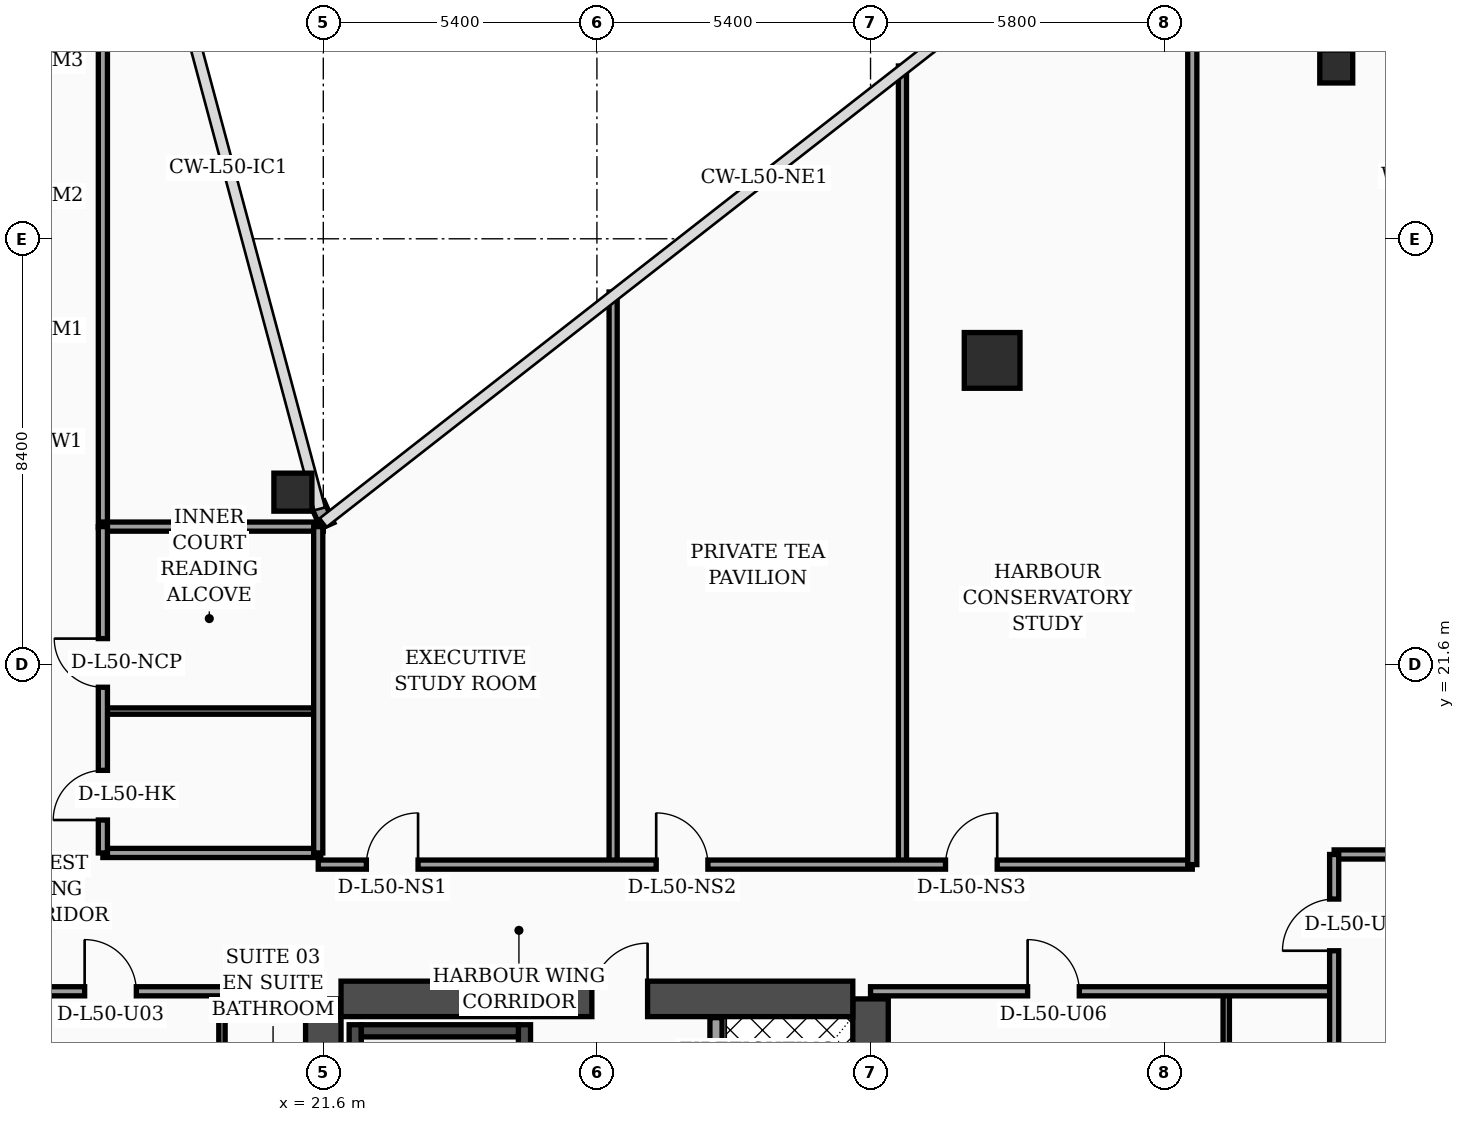
"""IFC4 building model, lengths in metres.
Left out: names, types, materials, properties, quantities, classifications, styles, units other than length and angle.
Written with IfcOpenShell. Run it as: python <this file> out.ifc"""

import sys

from ifc_helpers import new_model, si_unit, direction, frame, frame_2d, origin, origin_2d, place, context, subcontext, project, spatial, rectangle, hollow_rectangle, circle, extrude, element, fill, save


model = new_model("IFC4")
c1 = context("Model", 3, precision=1e-05, world=origin(), true_north=direction((0.0, 1.0)))
c2 = subcontext(c1, "Body", "Model", "MODEL_VIEW")
j1 = project(units=[si_unit("LENGTHUNIT", "METRE"), si_unit("PLANEANGLEUNIT", "RADIAN")], contexts=[c1])
p1 = place(None, origin())
s1 = spatial("IfcSite", under=j1, at=p1, CompositionType="ELEMENT")
p2 = place(p1, origin())
s2 = spatial("IfcBuilding", under=s1, at=p2, CompositionType="ELEMENT")
p3 = place(p2, frame((0.0, 0.0, 203.4)))
s3 = spatial("IfcBuildingStorey", under=s2, at=p3, CompositionType="ELEMENT", Elevation=203.4)
for number, where, z_axis, x_axis in (
    (1, (21.6, 4.6, 0.0), (0.0, 0.0, 1.0), (0.0, 1.0, 0.0)),
    (2, (32.4, 4.6, 0.0), (0.0, 0.0, 1.0), (0.0, 1.0, 0.0)),
):
    element("IfcWall", number, at=place(p3, frame(where, z_axis=z_axis, x_axis=x_axis)), inside=s3, PredefinedType="SHEAR", context=c2, shape_type="SweptSolid", body=[
        extrude(rectangle(XDim=10.4, YDim=0.7, at=frame_2d((5.2, 0.0))), origin(), (0.0, 0.0, 1.0), 3.56),
    ])
p4 = place(p3, frame((21.95, 15.0, 0.0), z_axis=(0.0, 0.0, 1.0), x_axis=(1.0, 0.0, 0.0)))
e3 = element("IfcWall", 3, at=p4, inside=s3, PredefinedType="SHEAR", context=c2, shape_type="SweptSolid", body=[
    extrude(rectangle(XDim=10.1, YDim=0.7, at=frame_2d((5.05, 0.0))), origin(), (0.0, 0.0, 1.0), 3.56),
])
p5 = place(p4, frame((4.95, 0.0, 0.0)))
e4 = element("IfcOpeningElement", 4, at=p5, cuts=e3, PredefinedType="OPENING", context=c2, shape_type="SweptSolid", body=[
    extrude(rectangle(XDim=1.1, YDim=2.2, at=frame_2d((0.55, 1.1))), frame((0.0, 0.36, 0.0), z_axis=(0.0, -1.0, 0.0), x_axis=(1.0, 0.0, 0.0)), (0.0, 0.0, 1.0), 0.72),
])
p6 = place(p3, frame((22.23, 4.95, 0.0), z_axis=(0.0, 0.0, 1.0), x_axis=(0.0, 1.0, 0.0)))
e5 = element("IfcWall", 5, at=p6, inside=s3, PredefinedType="SOLIDWALL", context=c2, shape_type="SweptSolid", body=[
    extrude(rectangle(XDim=9.54, YDim=0.24, at=frame_2d((4.77, 0.0))), origin(), (0.0, 0.0, 1.0), 3.56),
])
p7 = place(p3, frame((25.57, 4.95, 0.0), z_axis=(0.0, 0.0, 1.0), x_axis=(0.0, 1.0, 0.0)))
e6 = element("IfcWall", 6, at=p7, inside=s3, PredefinedType="SOLIDWALL", context=c2, shape_type="SweptSolid", body=[
    extrude(rectangle(XDim=9.54, YDim=0.24, at=frame_2d((4.77, 0.0))), origin(), (0.0, 0.0, 1.0), 3.56),
])
p8 = place(p7, frame((0.35, 0.0, 0.0)))
e7 = element("IfcOpeningElement", 7, at=p8, cuts=e6, PredefinedType="OPENING", context=c2, shape_type="SweptSolid", body=[
    extrude(rectangle(XDim=1.15, YDim=2.2, at=frame_2d((0.575, 1.1))), frame((0.0, 0.13, 0.0), z_axis=(0.0, -1.0, 0.0), x_axis=(1.0, 0.0, 0.0)), (0.0, 0.0, 1.0), 0.26),
])
p9 = place(p3, frame((22.35, 14.37, 0.0), z_axis=(0.0, 0.0, 1.0), x_axis=(1.0, 0.0, 0.0)))
e8 = element("IfcWall", 8, at=p9, inside=s3, PredefinedType="SOLIDWALL", context=c2, shape_type="SweptSolid", body=[
    extrude(rectangle(XDim=3.1, YDim=0.24, at=frame_2d((1.55, 0.0))), origin(), (0.0, 0.0, 1.0), 3.56),
])
p10 = place(p3, frame((21.0, 25.0, 0.0), z_axis=(0.0, 0.0, 1.0), x_axis=(1.0, 0.0, 0.0)))
e9 = element("IfcColumn", 9, at=p10, inside=s3, PredefinedType="COLUMN", context=c2, shape_type="SweptSolid", body=[
    extrude(hollow_rectangle(XDim=0.75, YDim=0.75, WallThickness=0.032, at=origin_2d()), origin(), (0.0, 0.0, 1.0), 3.56),
])
p11 = place(p3, frame((34.8, 27.6, 0.0), z_axis=(0.0, 0.0, 1.0), x_axis=(1.0, 0.0, 0.0)))
e10 = element("IfcColumn", 10, at=p11, inside=s3, PredefinedType="COLUMN", context=c2, shape_type="SweptSolid", body=[
    extrude(circle(Radius=0.55, at=origin_2d()), origin(), (0.0, 0.0, 1.0), 3.56),
])
p12 = place(p3, frame((41.591, 33.4, 0.0), z_axis=(0.0, 0.0, 1.0), x_axis=(1.0, 0.0, 0.0)))
e11 = element("IfcColumn", 11, at=p12, inside=s3, PredefinedType="COLUMN", context=c2, shape_type="SweptSolid", body=[
    extrude(hollow_rectangle(XDim=0.65, YDim=0.65, WallThickness=0.028, at=origin_2d()), origin(), (0.0, 0.0, 1.0), 3.56),
])
p13 = place(p3, frame((21.68, 24.34, 0.0), z_axis=(0.0, 0.0, 1.0), x_axis=(-0.40758134973, 0.913168901875, 0.0)))
e12 = element("IfcWall", 12, at=p13, inside=s3, PredefinedType="SOLIDWALL", context=c2, shape_type="SweptSolid", body=[
    extrude(rectangle(XDim=0.471, YDim=0.28, at=frame_2d((0.235, 0.0))), origin(), (0.0, 0.0, 1.0), 3.56),
])
p14 = place(p3, frame((29.35, 4.97, 0.0), z_axis=(0.0, 0.0, 1.0), x_axis=(0.0, 1.0, 0.0)))
e13 = element("IfcWall", 13, at=p14, inside=s3, PredefinedType="SOLIDWALL", context=c2, shape_type="SweptSolid", body=[
    extrude(rectangle(XDim=9.66, YDim=0.24, at=frame_2d((4.83, 0.0))), origin(), (0.0, 0.0, 1.0), 3.56),
])
p15 = place(p14, frame((0.55, 0.0, 0.0)))
e14 = element("IfcOpeningElement", 14, at=p15, cuts=e13, PredefinedType="OPENING", context=c2, shape_type="SweptSolid", body=[
    extrude(rectangle(XDim=1.3, YDim=2.35, at=frame_2d((0.65, 1.175))), frame((0.0, 0.13, 0.0), z_axis=(0.0, -1.0, 0.0), x_axis=(1.0, 0.0, 0.0)), (0.0, 0.0, 1.0), 0.26),
])
p16 = place(p3, frame((19.6, 2.44, 0.0), z_axis=(0.0, 0.0, 1.0), x_axis=(0.0, 1.0, 0.0)))
e15 = element("IfcWall", 15, at=p16, inside=s3, PredefinedType="PARTITIONING", context=c2, shape_type="SweptSolid", body=[
    extrude(rectangle(XDim=12.71, YDim=0.125, at=frame_2d((6.355, 0.0))), origin(), (0.0, 0.0, 1.0), 2.59),
])
p17 = place(p16, frame((4.34, 0.0, 0.0)))
e16 = element("IfcOpeningElement", 16, at=p17, cuts=e15, PredefinedType="OPENING", context=c2, shape_type="SweptSolid", body=[
    extrude(rectangle(XDim=0.96, YDim=2.2, at=frame_2d((0.48, 1.1))), frame((0.0, 0.073, 0.0), z_axis=(0.0, -1.0, 0.0), x_axis=(1.0, 0.0, 0.0)), (0.0, 0.0, 1.0), 0.145),
])
p18 = place(p16, frame((10.18, 0.0, 0.0)))
e17 = element("IfcOpeningElement", 17, at=p18, cuts=e15, PredefinedType="OPENING", context=c2, shape_type="SweptSolid", body=[
    extrude(rectangle(XDim=0.9, YDim=2.15, at=frame_2d((0.45, 1.075))), frame((0.0, 0.073, 0.0), z_axis=(0.0, -1.0, 0.0), x_axis=(1.0, 0.0, 0.0)), (0.0, 0.0, 1.0), 0.145),
])
p19 = place(p3, frame((15.15, 15.15, 0.0), z_axis=(0.0, 0.0, 1.0), x_axis=(1.0, 0.0, 0.0)))
e18 = element("IfcWall", 18, at=p19, inside=s3, PredefinedType="PARTITIONING", context=c2, shape_type="SweptSolid", body=[
    extrude(rectangle(XDim=6.45, YDim=0.18, at=frame_2d((3.225, 0.0))), origin(), (0.0, 0.0, 1.0), 2.59),
])
p20 = place(p19, frame((1.74, 0.0, 0.0)))
e19 = element("IfcOpeningElement", 19, at=p20, cuts=e18, PredefinedType="OPENING", context=c2, shape_type="SweptSolid", body=[
    extrude(rectangle(XDim=1.02, YDim=2.2, at=frame_2d((0.51, 1.1))), frame((0.0, 0.1, 0.0), z_axis=(0.0, -1.0, 0.0), x_axis=(1.0, 0.0, 0.0)), (0.0, 0.0, 1.0), 0.2),
])
p21 = place(p3, frame((17.25, 24.3, 0.0), z_axis=(0.0, 0.0, 1.0), x_axis=(0.0, 1.0, 0.0)))
e20 = element("IfcWall", 20, at=p21, inside=s3, PredefinedType="PARTITIONING", context=c2, shape_type="SweptSolid", body=[
    extrude(rectangle(XDim=18.15, YDim=0.18, at=frame_2d((9.075, 0.0))), origin(), (0.0, 0.0, 1.0), 2.94),
])
p22 = place(p3, frame((17.25, 17.88, 0.0), z_axis=(0.0, 0.0, 1.0), x_axis=(1.0, 0.0, 0.0)))
e21 = element("IfcWall", 21, at=p22, inside=s3, PredefinedType="PARTITIONING", context=c2, shape_type="SweptSolid", body=[
    extrude(rectangle(XDim=4.3, YDim=0.18, at=frame_2d((2.15, 0.0))), origin(), (0.0, 0.0, 1.0), 3.56),
])
p23 = place(p3, frame((17.25, 20.68, 0.0), z_axis=(0.0, 0.0, 1.0), x_axis=(1.0, 0.0, 0.0)))
e22 = element("IfcWall", 22, at=p23, inside=s3, PredefinedType="PARTITIONING", context=c2, shape_type="SweptSolid", body=[
    extrude(rectangle(XDim=4.3, YDim=0.125, at=frame_2d((2.15, 0.0))), origin(), (0.0, 0.0, 1.0), 3.56),
])
p24 = place(p3, frame((17.25, 24.32, 0.0), z_axis=(0.0, 0.0, 1.0), x_axis=(1.0, 0.0, 0.0)))
e23 = element("IfcWall", 23, at=p24, inside=s3, PredefinedType="PARTITIONING", context=c2, shape_type="SweptSolid", body=[
    extrude(rectangle(XDim=4.35, YDim=0.18, at=frame_2d((2.175, 0.0))), origin(), (0.0, 0.0, 1.0), 3.56),
])
p25 = place(p3, frame((21.5, 17.88, 0.0), z_axis=(0.0, 0.0, 1.0), x_axis=(0.0, 1.0, 0.0)))
e24 = element("IfcWall", 24, at=p25, inside=s3, PredefinedType="PARTITIONING", context=c2, shape_type="SweptSolid", body=[
    extrude(rectangle(XDim=6.44, YDim=0.18, at=frame_2d((3.22, 0.0))), origin(), (0.0, 0.0, 1.0), 3.09),
])
p26 = place(p3, frame((17.25, 17.88, 0.0), z_axis=(0.0, 0.0, 1.0), x_axis=(0.0, 1.0, 0.0)))
e25 = element("IfcWall", 25, at=p26, inside=s3, PredefinedType="PARTITIONING", context=c2, shape_type="SweptSolid", body=[
    extrude(rectangle(XDim=6.44, YDim=0.18, at=frame_2d((3.22, 0.0))), origin(), (0.0, 0.0, 1.0), 3.09),
])
p27 = place(p26, frame((0.65, 0.0, 0.0)))
e26 = element("IfcOpeningElement", 26, at=p27, cuts=e25, PredefinedType="OPENING", context=c2, shape_type="SweptSolid", body=[
    extrude(rectangle(XDim=0.98, YDim=2.15, at=frame_2d((0.49, 1.075))), frame((0.0, 0.1, 0.0), z_axis=(0.0, -1.0, 0.0), x_axis=(1.0, 0.0, 0.0)), (0.0, 0.0, 1.0), 0.2),
])
p28 = place(p26, frame((3.27, 0.0, 0.0)))
e27 = element("IfcOpeningElement", 27, at=p28, cuts=e25, PredefinedType="OPENING", context=c2, shape_type="SweptSolid", body=[
    extrude(rectangle(XDim=0.96, YDim=2.2, at=frame_2d((0.48, 1.1))), frame((0.0, 0.1, 0.0), z_axis=(0.0, -1.0, 0.0), x_axis=(1.0, 0.0, 0.0)), (0.0, 0.0, 1.0), 0.2),
])
p29 = place(p3, frame((39.42, 2.44, 0.0), z_axis=(0.0, 0.0, 1.0), x_axis=(0.0, 1.0, 0.0)))
e28 = element("IfcWall", 28, at=p29, inside=s3, PredefinedType="PARTITIONING", context=c2, shape_type="SweptSolid", body=[
    extrude(rectangle(XDim=12.71, YDim=0.125, at=frame_2d((6.355, 0.0))), origin(), (0.0, 0.0, 1.0), 2.94),
])
p30 = place(p29, frame((4.35, 0.0, 0.0)))
e29 = element("IfcOpeningElement", 29, at=p30, cuts=e28, PredefinedType="OPENING", context=c2, shape_type="SweptSolid", body=[
    extrude(rectangle(XDim=0.96, YDim=2.2, at=frame_2d((0.48, 1.1))), frame((0.0, 0.073, 0.0), z_axis=(0.0, -1.0, 0.0), x_axis=(1.0, 0.0, 0.0)), (0.0, 0.0, 1.0), 0.145),
])
p31 = place(p29, frame((10.21, 0.0, 0.0)))
e30 = element("IfcOpeningElement", 30, at=p31, cuts=e28, PredefinedType="OPENING", context=c2, shape_type="SweptSolid", body=[
    extrude(rectangle(XDim=0.9, YDim=2.15, at=frame_2d((0.45, 1.075))), frame((0.0, 0.073, 0.0), z_axis=(0.0, -1.0, 0.0), x_axis=(1.0, 0.0, 0.0)), (0.0, 0.0, 1.0), 0.145),
])
p32 = place(p3, frame((32.4, 15.15, 0.0), z_axis=(0.0, 0.0, 1.0), x_axis=(1.0, 0.0, 0.0)))
e31 = element("IfcWall", 31, at=p32, inside=s3, PredefinedType="PARTITIONING", context=c2, shape_type="SweptSolid", body=[
    extrude(rectangle(XDim=9.15, YDim=0.18, at=frame_2d((4.575, 0.0))), origin(), (0.0, 0.0, 1.0), 2.94),
])
p33 = place(p32, frame((3.1, 0.0, 0.0)))
e32 = element("IfcOpeningElement", 32, at=p33, cuts=e31, PredefinedType="OPENING", context=c2, shape_type="SweptSolid", body=[
    extrude(rectangle(XDim=1.02, YDim=2.2, at=frame_2d((0.51, 1.1))), frame((0.0, 0.1, 0.0), z_axis=(0.0, -1.0, 0.0), x_axis=(1.0, 0.0, 0.0)), (0.0, 0.0, 1.0), 0.2),
])
p34 = place(p3, frame((27.32, 17.65, 0.0), z_axis=(0.0, 0.0, 1.0), x_axis=(0.0, 1.0, 0.0)))
e33 = element("IfcWall", 33, at=p34, inside=s3, PredefinedType="PARTITIONING", context=c2, shape_type="SweptSolid", body=[
    extrude(rectangle(XDim=11.3, YDim=0.16, at=frame_2d((5.65, 0.0))), origin(), (0.0, 0.0, 1.0), 2.94),
])
p35 = place(p3, frame((33.03, 17.65, 0.0), z_axis=(0.0, 0.0, 1.0), x_axis=(0.0, 1.0, 0.0)))
e34 = element("IfcWall", 34, at=p35, inside=s3, PredefinedType="PARTITIONING", context=c2, shape_type="SweptSolid", body=[
    extrude(rectangle(XDim=15.76, YDim=0.16, at=frame_2d((7.88, 0.0))), origin(), (0.0, 0.0, 1.0), 2.94),
])
p36 = place(p3, frame((21.5, 17.65, 0.0), z_axis=(0.0, 0.0, 1.0), x_axis=(1.0, 0.0, 0.0)))
e35 = element("IfcWall", 35, at=p36, inside=s3, PredefinedType="PARTITIONING", context=c2, shape_type="SweptSolid", body=[
    extrude(rectangle(XDim=17.25, YDim=0.18, at=frame_2d((8.625, 0.0))), origin(), (0.0, 0.0, 1.0), 2.94),
])
p37 = place(p36, frame((0.95, 0.0, 0.0)))
e36 = element("IfcOpeningElement", 36, at=p37, cuts=e35, PredefinedType="OPENING", context=c2, shape_type="SweptSolid", body=[
    extrude(rectangle(XDim=1.02, YDim=2.2, at=frame_2d((0.51, 1.1))), frame((0.0, 0.1, 0.0), z_axis=(0.0, -1.0, 0.0), x_axis=(1.0, 0.0, 0.0)), (0.0, 0.0, 1.0), 0.2),
])
p38 = place(p36, frame((6.67, 0.0, 0.0)))
e37 = element("IfcOpeningElement", 37, at=p38, cuts=e35, PredefinedType="OPENING", context=c2, shape_type="SweptSolid", body=[
    extrude(rectangle(XDim=1.02, YDim=2.2, at=frame_2d((0.51, 1.1))), frame((0.0, 0.1, 0.0), z_axis=(0.0, -1.0, 0.0), x_axis=(1.0, 0.0, 0.0)), (0.0, 0.0, 1.0), 0.2),
])
p39 = place(p36, frame((12.38, 0.0, 0.0)))
e38 = element("IfcOpeningElement", 38, at=p39, cuts=e35, PredefinedType="OPENING", context=c2, shape_type="SweptSolid", body=[
    extrude(rectangle(XDim=1.02, YDim=2.2, at=frame_2d((0.51, 1.1))), frame((0.0, 0.1, 0.0), z_axis=(0.0, -1.0, 0.0), x_axis=(1.0, 0.0, 0.0)), (0.0, 0.0, 1.0), 0.2),
])
p40 = place(p3, frame((38.75, 17.65, 0.0), z_axis=(0.0, 0.0, 1.0), x_axis=(0.0, 1.0, 0.0)))
e39 = element("IfcWall", 39, at=p40, inside=s3, PredefinedType="PARTITIONING", context=c2, shape_type="SweptSolid", body=[
    extrude(rectangle(XDim=20.23, YDim=0.18, at=frame_2d((10.115, 0.0))), origin(), (0.0, 0.0, 1.0), 2.94),
])
p41 = place(p3, frame((41.55, 17.85, 0.0), z_axis=(0.0, 0.0, 1.0), x_axis=(1.0, 0.0, 0.0)))
e40 = element("IfcWall", 40, at=p41, inside=s3, PredefinedType="PARTITIONING", context=c2, shape_type="SweptSolid", body=[
    extrude(rectangle(XDim=6.73, YDim=0.18, at=frame_2d((3.365, 0.0))), origin(), (0.0, 0.0, 1.0), 2.94),
])
p42 = place(p3, frame((41.55, 2.44, 0.0), z_axis=(0.0, 0.0, 1.0), x_axis=(0.0, 1.0, 0.0)))
e41 = element("IfcWall", 41, at=p42, inside=s3, PredefinedType="PARTITIONING", context=c2, shape_type="SweptSolid", body=[
    extrude(rectangle(XDim=15.41, YDim=0.18, at=frame_2d((7.705, 0.0))), origin(), (0.0, 0.0, 1.0), 2.94),
])
p43 = place(p42, frame((13.51, 0.0, 0.0)))
e42 = element("IfcOpeningElement", 42, at=p43, cuts=e41, PredefinedType="OPENING", context=c2, shape_type="SweptSolid", body=[
    extrude(rectangle(XDim=1.02, YDim=2.2, at=frame_2d((0.51, 1.1))), frame((0.0, 0.1, 0.0), z_axis=(0.0, -1.0, 0.0), x_axis=(1.0, 0.0, 0.0)), (0.0, 0.0, 1.0), 0.2),
])
p44 = place(p20, origin())
e43 = element("IfcDoor", 43, at=p44, inside=s3, OperationType="SINGLE_SWING_LEFT", PredefinedType="DOOR", context=c2, shape_type="SweptSolid", body=[
    extrude(rectangle(XDim=1.02, YDim=2.2, at=frame_2d((0.51, 1.1))), frame((0.0, 0.025, 0.0), z_axis=(0.0, -1.0, 0.0), x_axis=(1.0, 0.0, 0.0)), (0.0, 0.0, 1.0), 0.05),
])
fill(e19, e43)
p45 = place(p27, origin())
e44 = element("IfcDoor", 44, at=p45, inside=s3, OperationType="SINGLE_SWING_LEFT", PredefinedType="DOOR", context=c2, shape_type="SweptSolid", body=[
    extrude(rectangle(XDim=0.98, YDim=2.15, at=frame_2d((0.49, 1.075))), frame((0.0, 0.025, 0.0), z_axis=(0.0, -1.0, 0.0), x_axis=(1.0, 0.0, 0.0)), (0.0, 0.0, 1.0), 0.05),
])
fill(e26, e44)
p46 = place(p28, origin())
e45 = element("IfcDoor", 45, at=p46, inside=s3, OperationType="SINGLE_SWING_RIGHT", PredefinedType="DOOR", context=c2, shape_type="SweptSolid", body=[
    extrude(rectangle(XDim=0.96, YDim=2.2, at=frame_2d((0.48, 1.1))), frame((0.0, 0.025, 0.0), z_axis=(0.0, -1.0, 0.0), x_axis=(1.0, 0.0, 0.0)), (0.0, 0.0, 1.0), 0.05),
])
fill(e27, e45)
p47 = place(p33, origin())
e46 = element("IfcDoor", 46, at=p47, inside=s3, OperationType="SINGLE_SWING_LEFT", PredefinedType="DOOR", context=c2, shape_type="SweptSolid", body=[
    extrude(rectangle(XDim=1.02, YDim=2.2, at=frame_2d((0.51, 1.1))), frame((0.0, 0.025, 0.0), z_axis=(0.0, -1.0, 0.0), x_axis=(1.0, 0.0, 0.0)), (0.0, 0.0, 1.0), 0.05),
])
fill(e32, e46)
p48 = place(p37, origin())
e47 = element("IfcDoor", 47, at=p48, inside=s3, OperationType="SINGLE_SWING_RIGHT", PredefinedType="DOOR", context=c2, shape_type="SweptSolid", body=[
    extrude(rectangle(XDim=1.02, YDim=2.2, at=frame_2d((0.51, 1.1))), frame((0.0, 0.025, 0.0), z_axis=(0.0, -1.0, 0.0), x_axis=(1.0, 0.0, 0.0)), (0.0, 0.0, 1.0), 0.05),
])
fill(e36, e47)
p49 = place(p38, origin())
e48 = element("IfcDoor", 48, at=p49, inside=s3, OperationType="SINGLE_SWING_LEFT", PredefinedType="DOOR", context=c2, shape_type="SweptSolid", body=[
    extrude(rectangle(XDim=1.02, YDim=2.2, at=frame_2d((0.51, 1.1))), frame((0.0, 0.025, 0.0), z_axis=(0.0, -1.0, 0.0), x_axis=(1.0, 0.0, 0.0)), (0.0, 0.0, 1.0), 0.05),
])
fill(e37, e48)
p50 = place(p39, origin())
e49 = element("IfcDoor", 49, at=p50, inside=s3, OperationType="SINGLE_SWING_RIGHT", PredefinedType="DOOR", context=c2, shape_type="SweptSolid", body=[
    extrude(rectangle(XDim=1.02, YDim=2.2, at=frame_2d((0.51, 1.1))), frame((0.0, 0.025, 0.0), z_axis=(0.0, -1.0, 0.0), x_axis=(1.0, 0.0, 0.0)), (0.0, 0.0, 1.0), 0.05),
])
fill(e38, e49)
p51 = place(p43, origin())
e50 = element("IfcDoor", 50, at=p51, inside=s3, OperationType="SINGLE_SWING_LEFT", PredefinedType="DOOR", context=c2, shape_type="SweptSolid", body=[
    extrude(rectangle(XDim=1.02, YDim=2.2, at=frame_2d((0.51, 1.1))), frame((0.0, 0.025, 0.0), z_axis=(0.0, -1.0, 0.0), x_axis=(1.0, 0.0, 0.0)), (0.0, 0.0, 1.0), 0.05),
])
fill(e42, e50)
p52 = place(p5, origin())
e51 = element("IfcDoor", 51, at=p52, inside=s3, OperationType="SINGLE_SWING_RIGHT", PredefinedType="DOOR", context=c2, shape_type="SweptSolid", body=[
    extrude(rectangle(XDim=1.1, YDim=2.2, at=frame_2d((0.55, 1.1))), frame((0.0, 0.025, 0.0), z_axis=(0.0, -1.0, 0.0), x_axis=(1.0, 0.0, 0.0)), (0.0, 0.0, 1.0), 0.05),
])
fill(e4, e51)
save(model, sys.argv[1])
